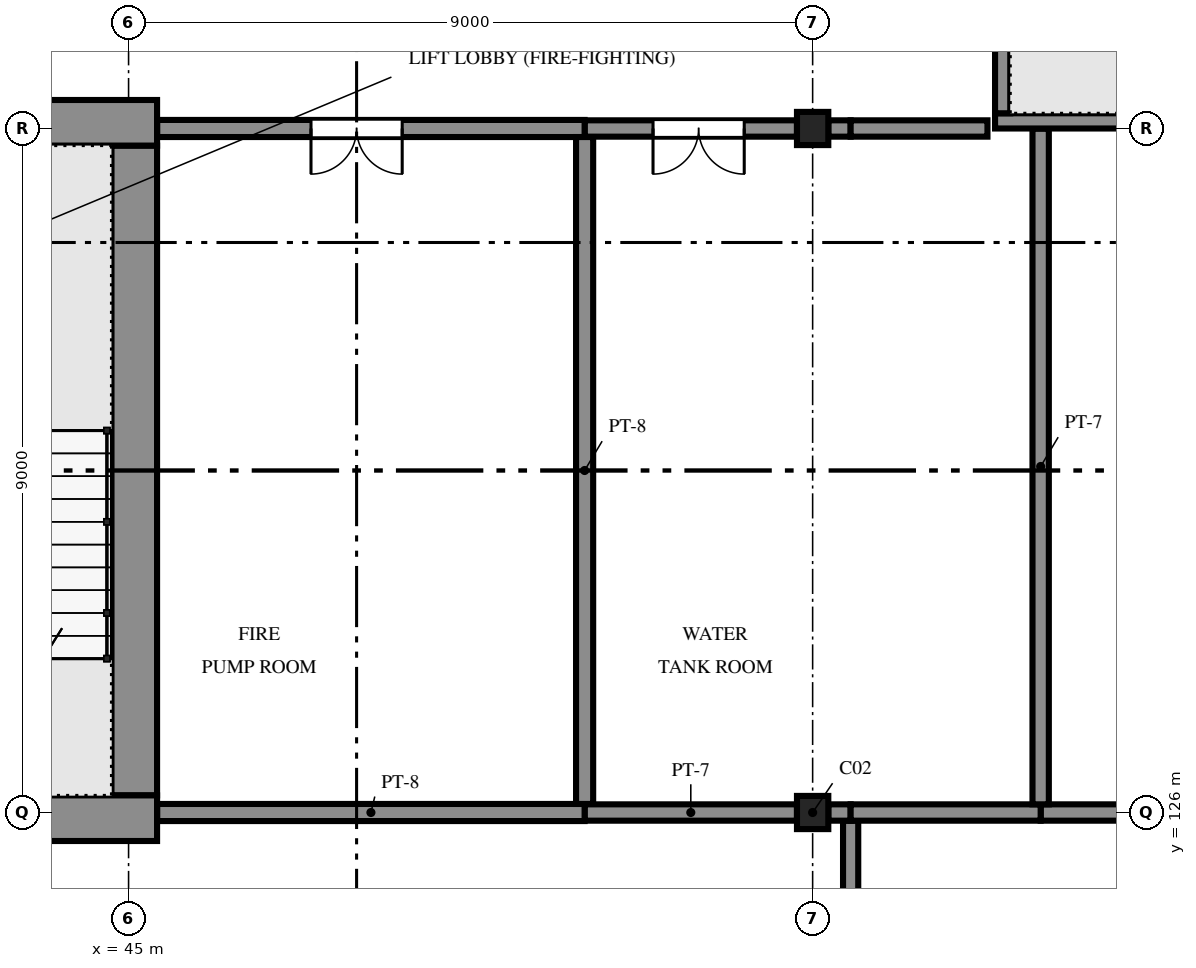
"""IFC4 building model, lengths in metres.
Left out: names, types, materials, properties, quantities, classifications, styles, units other than length and angle.
Written with IfcOpenShell. Run it as: python <this file> out.ifc"""

import sys

from ifc_helpers import new_model, si_unit, direction, frame, frame_2d, origin, origin_2d, place, context, subcontext, project, spatial, polyline, rectangle, i_section, outline, extrude, element, fill, save


model = new_model("IFC4")
c1 = context("Model", 3, precision=1e-05, world=origin(), true_north=direction((0.0, 1.0)))
c2 = subcontext(c1, "Body", "Model", "MODEL_VIEW")
j1 = project(units=[si_unit("LENGTHUNIT", "METRE"), si_unit("PLANEANGLEUNIT", "RADIAN")], contexts=[c1])
p1 = place(None, origin())
s1 = spatial("IfcSite", under=j1, at=p1, CompositionType="ELEMENT")
p2 = place(p1, origin())
s2 = spatial("IfcBuilding", under=s1, at=p2, CompositionType="ELEMENT")
p3 = place(p2, origin())
s3 = spatial("IfcBuildingStorey", under=s2, at=p3, CompositionType="ELEMENT", Elevation=0.0)
for number, where, z_axis, x_axis in (
    (1, (54.0, 126.0, -2.1), (0.0, 0.0, 1.0), (1.0, 0.0, 0.0)),
    (2, (54.0, 135.0, -2.1), (0.0, 0.0, 1.0), (1.0, 0.0, 0.0)),
):
    element("IfcColumn", number, at=place(p3, frame(where, z_axis=z_axis, x_axis=x_axis)), inside=s3, PredefinedType="COLUMN", context=c2, shape_type="SweptSolid", body=[
        extrude(i_section(OverallWidth=0.412, OverallDepth=0.437, WebThickness=0.036, FlangeThickness=0.058, FilletRadius=0.015, at=origin_2d()), origin(), (0.0, 0.0, 1.0), 9.6),
    ])
p4 = place(p3, frame((26.625, 125.925, -2.1), z_axis=(0.0, 0.0, 1.0), x_axis=(1.0, 0.0, 0.0)))
e3 = element("IfcWall", 3, at=p4, inside=s3, PredefinedType="SOLIDWALL", context=c2, shape_type="SweptSolid", body=[
    extrude(rectangle(XDim=18.75, YDim=0.6, at=frame_2d((9.375, 0.0))), origin(), (0.0, 0.0, 1.0), 9.6),
])
p5 = place(p4, frame((1.575, 0.0, 2.1)))
e4 = element("IfcOpeningElement", 4, at=p5, cuts=e3, PredefinedType="OPENING", context=c2, shape_type="SweptSolid", body=[
    extrude(rectangle(XDim=1.8, YDim=2.1, at=frame_2d((0.9, 1.05))), frame((0.0, 0.31, 0.0), z_axis=(0.0, -1.0, 0.0), x_axis=(1.0, 0.0, 0.0)), (0.0, 0.0, 1.0), 0.62),
])
p6 = place(p4, frame((12.325, 0.0, 2.1)))
e5 = element("IfcOpeningElement", 5, at=p6, cuts=e3, PredefinedType="OPENING", context=c2, shape_type="SweptSolid", body=[
    extrude(rectangle(XDim=0.7, YDim=2.0, at=frame_2d((0.35, 1.0))), frame((0.0, 0.31, 0.0), z_axis=(0.0, -1.0, 0.0), x_axis=(1.0, 0.0, 0.0)), (0.0, 0.0, 1.0), 0.62),
])
p7 = place(p3, frame((26.625, 135.075, -2.1), z_axis=(0.0, 0.0, 1.0), x_axis=(1.0, 0.0, 0.0)))
e6 = element("IfcWall", 6, at=p7, inside=s3, PredefinedType="SOLIDWALL", context=c2, shape_type="SweptSolid", body=[
    extrude(rectangle(XDim=18.75, YDim=0.6, at=frame_2d((9.375, 0.0))), origin(), (0.0, 0.0, 1.0), 9.6),
])
p8 = place(p7, frame((15.375, 0.0, 2.1)))
e7 = element("IfcOpeningElement", 7, at=p8, cuts=e6, PredefinedType="OPENING", context=c2, shape_type="SweptSolid", body=[
    extrude(rectangle(XDim=1.8, YDim=2.1, at=frame_2d((0.9, 1.05))), frame((0.0, 0.31, 0.0), z_axis=(0.0, -1.0, 0.0), x_axis=(1.0, 0.0, 0.0)), (0.0, 0.0, 1.0), 0.62),
])
p9 = place(p7, frame((6.975, 0.0, 2.1)))
e8 = element("IfcOpeningElement", 8, at=p9, cuts=e6, PredefinedType="OPENING", context=c2, shape_type="SweptSolid", body=[
    extrude(rectangle(XDim=1.2, YDim=2.1, at=frame_2d((0.6, 1.05))), frame((0.0, 0.31, 0.0), z_axis=(0.0, -1.0, 0.0), x_axis=(1.0, 0.0, 0.0)), (0.0, 0.0, 1.0), 0.62),
])
p10 = place(p7, frame((12.275, 0.0, 2.1)))
e9 = element("IfcOpeningElement", 9, at=p10, cuts=e6, PredefinedType="OPENING", context=c2, shape_type="SweptSolid", body=[
    extrude(rectangle(XDim=1.2, YDim=2.1, at=frame_2d((0.6, 1.05))), frame((0.0, 0.31, 0.0), z_axis=(0.0, -1.0, 0.0), x_axis=(1.0, 0.0, 0.0)), (0.0, 0.0, 1.0), 0.62),
])
p11 = place(p3, frame((45.075, 126.225, -2.1), z_axis=(0.0, 0.0, 1.0), x_axis=(0.0, 1.0, 0.0)))
e10 = element("IfcWall", 10, at=p11, inside=s3, PredefinedType="SOLIDWALL", context=c2, shape_type="SweptSolid", body=[
    extrude(rectangle(XDim=8.55, YDim=0.6, at=frame_2d((4.275, 0.0))), origin(), (0.0, 0.0, 1.0), 9.6),
])
p12 = place(p3, frame((56.4, 135.1, 0.0), z_axis=(0.0, 0.0, 1.0), x_axis=(1.0, 0.0, 0.0)))
e11 = element("IfcWall", 11, at=p12, inside=s3, PredefinedType="SOLIDWALL", context=c2, shape_type="SweptSolid", body=[
    extrude(rectangle(XDim=4.2, YDim=0.2, at=frame_2d((2.1, 0.0))), origin(), (0.0, 0.0, 1.0), 6.692),
])
p13 = place(p3, frame((56.5, 135.2, 0.0), z_axis=(0.0, 0.0, 1.0), x_axis=(0.0, 1.0, 0.0)))
e12 = element("IfcWall", 12, at=p13, inside=s3, PredefinedType="SOLIDWALL", context=c2, shape_type="SweptSolid", body=[
    extrude(rectangle(XDim=8.4, YDim=0.2, at=frame_2d((4.2, 0.0))), origin(), (0.0, 0.0, 1.0), 6.692),
])
p14 = place(p13, frame((0.9, 0.0, 0.0)))
e13 = element("IfcOpeningElement", 13, at=p14, cuts=e12, PredefinedType="OPENING", context=c2, shape_type="SweptSolid", body=[
    extrude(rectangle(XDim=1.8, YDim=2.1, at=frame_2d((0.9, 1.05))), frame((0.0, 0.11, 0.0), z_axis=(0.0, -1.0, 0.0), x_axis=(1.0, 0.0, 0.0)), (0.0, 0.0, 1.0), 0.22),
])
p15 = place(p3, frame((54.5, 125.893, 0.0), z_axis=(0.0, 0.0, 1.0), x_axis=(0.0, -1.0, 0.0)))
e14 = element("IfcWall", 14, at=p15, inside=s3, PredefinedType="PARTITIONING", context=c2, shape_type="SweptSolid", body=[
    extrude(rectangle(XDim=2.893, YDim=0.2, at=frame_2d((1.446, 0.0))), origin(), (0.0, 0.0, 1.0), 6.6),
])
p16 = place(p3, frame((54.5, 135.0, 0.0), z_axis=(0.0, 0.0, 1.0), x_axis=(-1.0, 0.0, 0.0)))
e15 = element("IfcWall", 15, at=p16, inside=s3, PredefinedType="PARTITIONING", context=c2, shape_type="SweptSolid", body=[
    extrude(rectangle(XDim=0.294, YDim=0.215, at=frame_2d((0.147, 0.0))), origin(), (0.0, 0.0, 1.0), 6.6),
])
p17 = place(p3, frame((53.794, 135.0, 0.0), z_axis=(0.0, 0.0, 1.0), x_axis=(-1.0, 0.0, 0.0)))
e16 = element("IfcWall", 16, at=p17, inside=s3, PredefinedType="PARTITIONING", context=c2, shape_type="SweptSolid", body=[
    extrude(rectangle(XDim=2.794, YDim=0.215, at=frame_2d((1.397, 0.0))), origin(), (0.0, 0.0, 1.0), 6.6),
])
p18 = place(p17, frame((0.694, 0.0, 0.0)))
e17 = element("IfcOpeningElement", 17, at=p18, cuts=e16, PredefinedType="OPENING", context=c2, shape_type="SweptSolid", body=[
    extrude(rectangle(XDim=1.2, YDim=2.4, at=frame_2d((0.6, 1.2))), frame((0.0, 0.117, 0.0), z_axis=(0.0, -1.0, 0.0), x_axis=(1.0, 0.0, 0.0)), (0.0, 0.0, 1.0), 0.235),
])
p19 = place(p3, frame((51.0, 126.0, 0.0), z_axis=(0.0, 0.0, 1.0), x_axis=(1.0, 0.0, 0.0)))
e18 = element("IfcWall", 18, at=p19, inside=s3, PredefinedType="PARTITIONING", context=c2, shape_type="SweptSolid", body=[
    extrude(rectangle(XDim=2.794, YDim=0.215, at=frame_2d((1.397, 0.0))), origin(), (0.0, 0.0, 1.0), 6.6),
])
p20 = place(p3, frame((54.206, 126.0, 0.0), z_axis=(0.0, 0.0, 1.0), x_axis=(1.0, 0.0, 0.0)))
e19 = element("IfcWall", 19, at=p20, inside=s3, PredefinedType="PARTITIONING", context=c2, shape_type="SweptSolid", body=[
    extrude(rectangle(XDim=0.294, YDim=0.215, at=frame_2d((0.147, 0.0))), origin(), (0.0, 0.0, 1.0), 6.6),
])
p21 = place(p3, frame((51.0, 135.0, 0.0), z_axis=(0.0, 0.0, 1.0), x_axis=(-1.0, 0.0, 0.0)))
e20 = element("IfcWall", 20, at=p21, inside=s3, PredefinedType="PARTITIONING", context=c2, shape_type="SweptSolid", body=[
    extrude(rectangle(XDim=5.623, YDim=0.225, at=frame_2d((2.812, 0.0))), origin(), (0.0, 0.0, 1.0), 6.6),
])
p22 = place(p21, frame((2.4, 0.0, 0.0)))
e21 = element("IfcOpeningElement", 21, at=p22, cuts=e20, PredefinedType="OPENING", context=c2, shape_type="SweptSolid", body=[
    extrude(rectangle(XDim=1.2, YDim=2.4, at=frame_2d((0.6, 1.2))), frame((0.0, 0.123, 0.0), z_axis=(0.0, -1.0, 0.0), x_axis=(1.0, 0.0, 0.0)), (0.0, 0.0, 1.0), 0.245),
])
p23 = place(p3, frame((45.377, 126.0, 0.0), z_axis=(0.0, 0.0, 1.0), x_axis=(1.0, 0.0, 0.0)))
e22 = element("IfcWall", 22, at=p23, inside=s3, PredefinedType="PARTITIONING", context=c2, shape_type="SweptSolid", body=[
    extrude(rectangle(XDim=5.623, YDim=0.225, at=frame_2d((2.812, 0.0))), origin(), (0.0, 0.0, 1.0), 6.6),
])
p24 = place(p3, frame((56.3, 135.0, 0.0), z_axis=(0.0, 0.0, 1.0), x_axis=(-1.0, 0.0, 0.0)))
e23 = element("IfcWall", 23, at=p24, inside=s3, PredefinedType="PARTITIONING", context=c2, shape_type="SweptSolid", body=[
    extrude(rectangle(XDim=1.8, YDim=0.215, at=frame_2d((0.9, 0.0))), origin(), (0.0, 0.0, 1.0), 6.6),
])
p25 = place(p3, frame((57.0, 126.0, 0.0), z_axis=(0.0, 0.0, 1.0), x_axis=(1.0, 0.0, 0.0)))
e24 = element("IfcWall", 24, at=p25, inside=s3, PredefinedType="PARTITIONING", context=c2, shape_type="SweptSolid", body=[
    extrude(rectangle(XDim=5.801, YDim=0.215, at=frame_2d((2.9, 0.0))), origin(), (0.0, 0.0, 1.0), 6.6),
])
p26 = place(p3, frame((54.5, 126.0, 0.0), z_axis=(0.0, 0.0, 1.0), x_axis=(1.0, 0.0, 0.0)))
e25 = element("IfcWall", 25, at=p26, inside=s3, PredefinedType="PARTITIONING", context=c2, shape_type="SweptSolid", body=[
    extrude(rectangle(XDim=2.5, YDim=0.215, at=frame_2d((1.25, 0.0))), origin(), (0.0, 0.0, 1.0), 6.6),
])
p27 = place(p3, frame((51.0, 134.887, 0.0), z_axis=(0.0, 0.0, 1.0), x_axis=(0.0, -1.0, 0.0)))
e26 = element("IfcWall", 26, at=p27, inside=s3, PredefinedType="PARTITIONING", context=c2, shape_type="SweptSolid", body=[
    extrude(rectangle(XDim=8.775, YDim=0.225, at=frame_2d((4.387, 0.0))), origin(), (0.0, 0.0, 1.0), 6.6),
])
p28 = place(p3, frame((57.0, 134.998, 0.0), z_axis=(0.0, 0.0, 1.0), x_axis=(0.0, -1.0, 0.0)))
e27 = element("IfcWall", 27, at=p28, inside=s3, PredefinedType="PARTITIONING", context=c2, shape_type="SweptSolid", body=[
    extrude(rectangle(XDim=8.891, YDim=0.215, at=frame_2d((4.445, 0.0))), origin(), (0.0, 0.0, 1.0), 6.6),
])
p29 = place(p22, origin())
e28 = element("IfcDoor", 28, at=p29, inside=s3, OperationType="DOUBLE_DOOR_SINGLE_SWING", PredefinedType="DOOR", context=c2, shape_type="SweptSolid", body=[
    extrude(outline(polyline([(0.0, 0.0), (0.07, 0.0), (0.07, 2.33), (1.13, 2.33), (1.13, 0.0), (1.2, 0.0), (1.2, 2.4), (0.0, 2.4), (0.0, 0.0)])), frame((0.0, 0.025, 0.0), z_axis=(0.0, -1.0, 0.0), x_axis=(1.0, 0.0, 0.0)), (0.0, 0.0, 1.0), 0.05),
    extrude(outline(polyline([(0.074, 0.01), (0.597, 0.01), (0.597, 2.326), (0.074, 2.326), (0.074, 0.01)]), holes=[polyline([(0.178, 0.427), (0.492, 0.427), (0.492, 2.048), (0.178, 2.048), (0.178, 0.427)])]), frame((0.0, 0.017, 0.0), z_axis=(0.0, -1.0, 0.0), x_axis=(1.0, 0.0, 0.0)), (0.0, 0.0, 1.0), 0.035),
    extrude(rectangle(XDim=0.314, YDim=1.621, at=frame_2d((0.335, 1.237))), frame((0.0, 0.009, 0.0), z_axis=(0.0, -1.0, 0.0), x_axis=(1.0, 0.0, 0.0)), (0.0, 0.0, 1.0), 0.017),
    extrude(outline(polyline([(0.603, 0.01), (1.126, 0.01), (1.126, 2.326), (0.603, 2.326), (0.603, 0.01)]), holes=[polyline([(0.708, 0.427), (1.021, 0.427), (1.021, 2.048), (0.708, 2.048), (0.708, 0.427)])]), frame((0.0, 0.017, 0.0), z_axis=(0.0, -1.0, 0.0), x_axis=(1.0, 0.0, 0.0)), (0.0, 0.0, 1.0), 0.035),
    extrude(rectangle(XDim=0.314, YDim=1.621, at=frame_2d((0.865, 1.237))), frame((0.0, 0.009, 0.0), z_axis=(0.0, -1.0, 0.0), x_axis=(1.0, 0.0, 0.0)), (0.0, 0.0, 1.0), 0.017),
])
fill(e21, e28)
p30 = place(p18, origin())
e29 = element("IfcDoor", 29, at=p30, inside=s3, OperationType="DOUBLE_DOOR_SINGLE_SWING", PredefinedType="DOOR", context=c2, shape_type="SweptSolid", body=[
    extrude(outline(polyline([(0.0, 0.0), (0.07, 0.0), (0.07, 2.33), (1.13, 2.33), (1.13, 0.0), (1.2, 0.0), (1.2, 2.4), (0.0, 2.4), (0.0, 0.0)])), frame((0.0, 0.025, 0.0), z_axis=(0.0, -1.0, 0.0), x_axis=(1.0, 0.0, 0.0)), (0.0, 0.0, 1.0), 0.05),
    extrude(outline(polyline([(0.074, 0.01), (0.597, 0.01), (0.597, 2.326), (0.074, 2.326), (0.074, 0.01)]), holes=[polyline([(0.178, 0.427), (0.492, 0.427), (0.492, 2.048), (0.178, 2.048), (0.178, 0.427)])]), frame((0.0, 0.017, 0.0), z_axis=(0.0, -1.0, 0.0), x_axis=(1.0, 0.0, 0.0)), (0.0, 0.0, 1.0), 0.035),
    extrude(rectangle(XDim=0.314, YDim=1.621, at=frame_2d((0.335, 1.237))), frame((0.0, 0.009, 0.0), z_axis=(0.0, -1.0, 0.0), x_axis=(1.0, 0.0, 0.0)), (0.0, 0.0, 1.0), 0.017),
    extrude(outline(polyline([(0.603, 0.01), (1.126, 0.01), (1.126, 2.326), (0.603, 2.326), (0.603, 0.01)]), holes=[polyline([(0.708, 0.427), (1.021, 0.427), (1.021, 2.048), (0.708, 2.048), (0.708, 0.427)])]), frame((0.0, 0.017, 0.0), z_axis=(0.0, -1.0, 0.0), x_axis=(1.0, 0.0, 0.0)), (0.0, 0.0, 1.0), 0.035),
    extrude(rectangle(XDim=0.314, YDim=1.621, at=frame_2d((0.865, 1.237))), frame((0.0, 0.009, 0.0), z_axis=(0.0, -1.0, 0.0), x_axis=(1.0, 0.0, 0.0)), (0.0, 0.0, 1.0), 0.017),
])
fill(e17, e29)
save(model, sys.argv[1])
